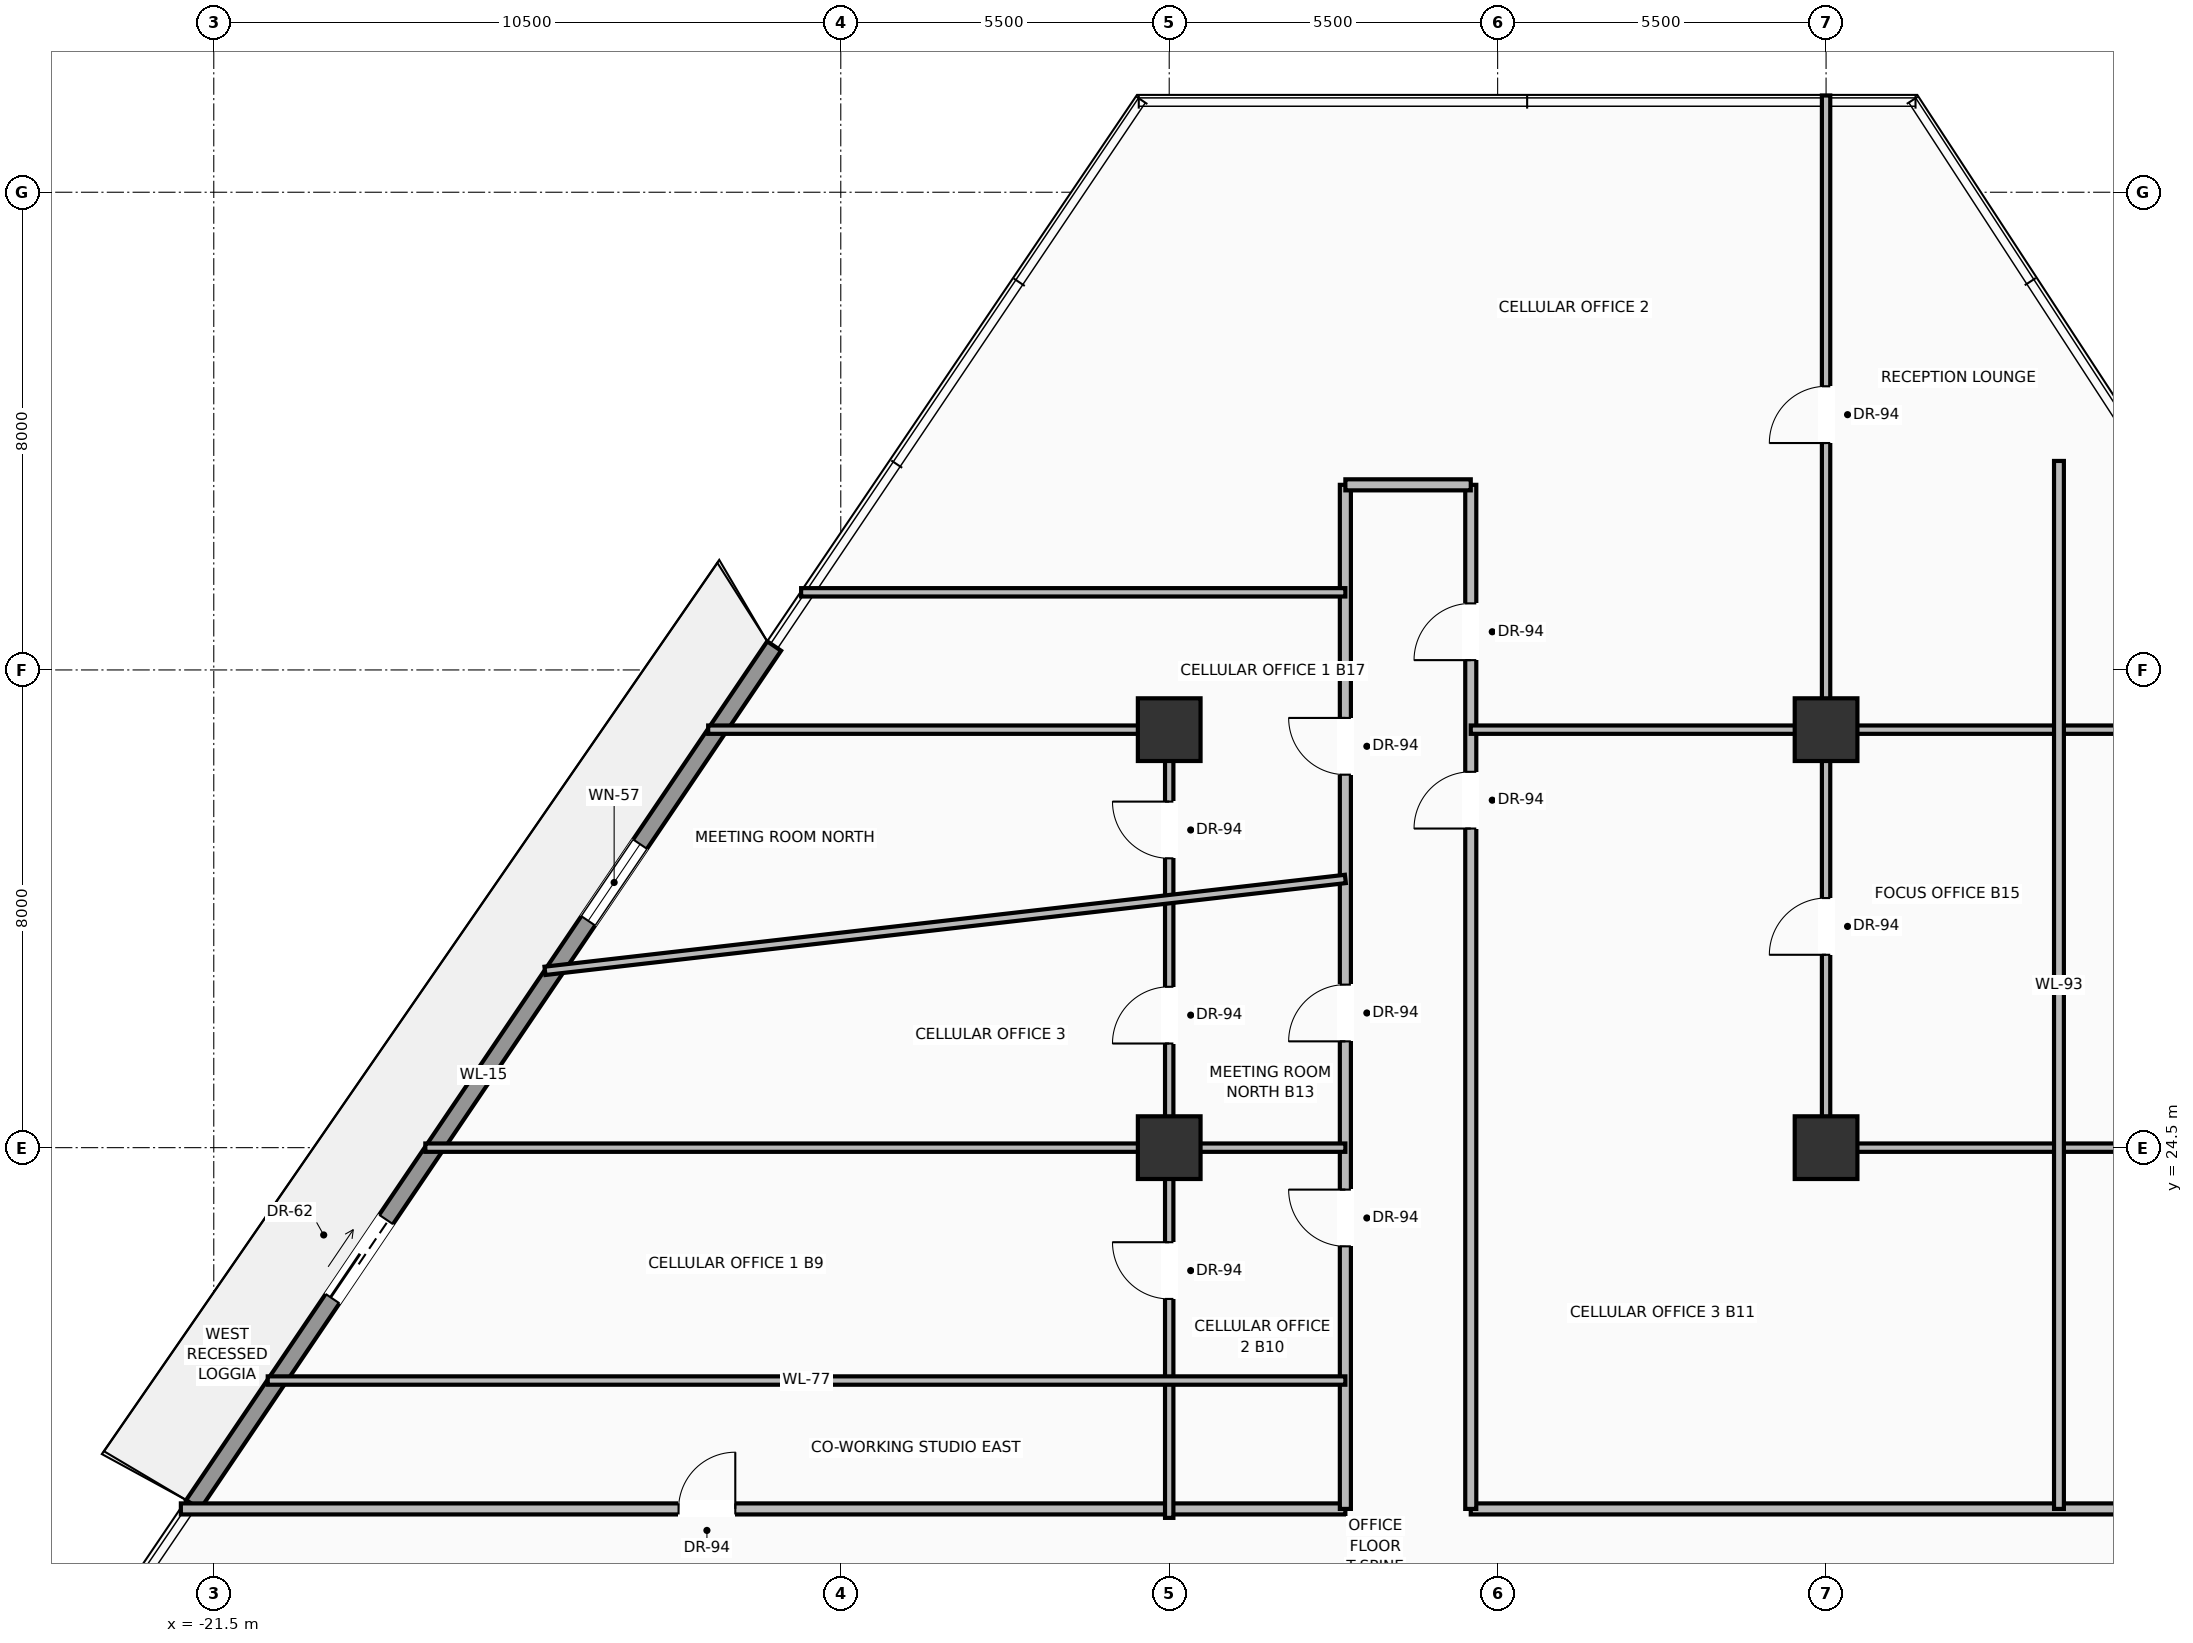
"""IFC4 building model, lengths in metres.
Left out: names, types, materials, properties, quantities, classifications, styles, units other than length and angle.
Written with IfcOpenShell. Run it as: python <this file> out.ifc"""

import sys

from ifc_helpers import new_model, si_unit, direction, frame, frame_2d, origin, origin_2d, place, context, subcontext, project, spatial, rectangle, extrude, source, transform, mapped, element, fill, save


model = new_model("IFC4")
c1 = context("Model", 3, precision=1e-05, world=origin(), true_north=direction((0.0, 1.0)))
c2 = subcontext(c1, "Body", "Model", "MODEL_VIEW")
j1 = project(units=[si_unit("LENGTHUNIT", "METRE"), si_unit("PLANEANGLEUNIT", "RADIAN")], contexts=[c1])
p1 = place(None, origin())
s1 = spatial("IfcSite", under=j1, at=p1, CompositionType="ELEMENT")
p2 = place(p1, origin())
s2 = spatial("IfcBuilding", under=s1, at=p2, CompositionType="ELEMENT")
p3 = place(p2, frame((0.0, 0.0, 80.3)))
s3 = spatial("IfcBuildingStorey", under=s2, at=p3, CompositionType="ELEMENT", Elevation=80.3)
m1 = source(origin(), c2, "Body", "SweptSolid", [
    extrude(rectangle(XDim=1.05, YDim=1.05, at=origin_2d()), origin(), (0.0, 0.0, 1.0), 3.7),
])
for number, where, z_axis, x_axis in (
    (1, (-5.5, 24.5, 0.0), (0.0, 0.0, 1.0), (1.0, 0.0, 0.0)),
    (2, (5.5, 24.5, 0.0), (0.0, 0.0, 1.0), (1.0, 0.0, 0.0)),
    (3, (-5.5, 31.5, 0.0), (0.0, 0.0, 1.0), (1.0, 0.0, 0.0)),
    (4, (5.5, 31.5, 0.0), (0.0, 0.0, 1.0), (1.0, 0.0, 0.0)),
):
    element("IfcColumn", number, at=place(p3, frame(where, z_axis=z_axis, x_axis=x_axis)), inside=s3, PredefinedType="COLUMN", context=c2, shape_type="MappedRepresentation", body=[
        mapped(m1, transform((0.0, 0.0, 0.0), scale=1.0)),
    ])
p4 = place(p3, frame((-21.846, 18.521, 0.0), z_axis=(0.0, 0.0, 1.0), x_axis=(0.560417461997, 0.828210280236, 0.0)))
e5 = element("IfcWall", 5, at=p4, inside=s3, PredefinedType="SOLIDWALL", context=c2, shape_type="SweptSolid", body=[
    extrude(rectangle(XDim=17.363, YDim=0.28, at=frame_2d((8.681, 0.0))), origin(), (0.0, 0.0, 1.0), 3.03),
])
p5 = place(p4, frame((4.167, 0.0, 0.0)))
e6 = element("IfcOpeningElement", 6, at=p5, cuts=e5, PredefinedType="OPENING", context=c2, shape_type="SweptSolid", body=[
    extrude(rectangle(XDim=1.6, YDim=2.35, at=frame_2d((0.8, 1.175))), frame((0.0, 0.15, 0.0), z_axis=(0.0, -1.0, 0.0), x_axis=(1.0, 0.0, 0.0)), (0.0, 0.0, 1.0), 0.3),
])
p6 = place(p4, frame((11.807, 0.0, 0.9)))
e7 = element("IfcOpeningElement", 7, at=p6, cuts=e5, PredefinedType="OPENING", context=c2, shape_type="SweptSolid", body=[
    extrude(rectangle(XDim=1.55, YDim=1.85, at=frame_2d((0.775, 0.925))), frame((0.0, 0.15, 0.0), z_axis=(0.0, -1.0, 0.0), x_axis=(1.0, 0.0, 0.0)), (0.0, 0.0, 1.0), 0.3),
])
p7 = place(p3, frame((-22.051, 18.45, 0.0), z_axis=(0.0, 0.0, 1.0), x_axis=(1.0, 0.0, 0.0)))
e8 = element("IfcWall", 8, at=p7, inside=s3, PredefinedType="PARTITIONING", context=c2, shape_type="SweptSolid", body=[
    extrude(rectangle(XDim=19.501, YDim=0.185, at=frame_2d((9.75, 0.0))), origin(), (0.0, 0.0, 1.0), 2.747),
])
p8 = place(p7, frame((8.334, 0.0, 0.0)))
e9 = element("IfcOpeningElement", 9, at=p8, cuts=e8, PredefinedType="OPENING", context=c2, shape_type="SweptSolid", body=[
    extrude(rectangle(XDim=0.95, YDim=2.2, at=frame_2d((0.475, 1.1))), frame((0.0, 0.103, 0.0), z_axis=(0.0, -1.0, 0.0), x_axis=(1.0, 0.0, 0.0)), (0.0, 0.0, 1.0), 0.205),
])
p9 = place(p3, frame((-0.45, 18.45, 0.0), z_axis=(0.0, 0.0, 1.0), x_axis=(1.0, 0.0, 0.0)))
e10 = element("IfcWall", 10, at=p9, inside=s3, PredefinedType="PARTITIONING", context=c2, shape_type="SweptSolid", body=[
    extrude(rectangle(XDim=22.934, YDim=0.185, at=frame_2d((11.467, 0.0))), origin(), (0.0, 0.0, 1.0), 2.747),
])
p10 = place(p9, frame((12.104, 0.0, 0.0)))
e11 = element("IfcOpeningElement", 11, at=p10, cuts=e10, PredefinedType="OPENING", context=c2, shape_type="SweptSolid", body=[
    extrude(rectangle(XDim=0.95, YDim=2.2, at=frame_2d((0.475, 1.1))), frame((0.0, 0.103, 0.0), z_axis=(0.0, -1.0, 0.0), x_axis=(1.0, 0.0, 0.0)), (0.0, 0.0, 1.0), 0.205),
])
p11 = place(p3, frame((-2.55, 18.45, 0.0), z_axis=(0.0, 0.0, 1.0), x_axis=(0.0, 1.0, 0.0)))
e12 = element("IfcWall", 12, at=p11, inside=s3, PredefinedType="PARTITIONING", context=c2, shape_type="SweptSolid", body=[
    extrude(rectangle(XDim=17.15, YDim=0.185, at=frame_2d((8.575, 0.0))), origin(), (0.0, 0.0, 1.0), 2.747),
])
p12 = place(p11, frame((4.397, 0.0, 0.0)))
e13 = element("IfcOpeningElement", 13, at=p12, cuts=e12, PredefinedType="OPENING", context=c2, shape_type="SweptSolid", body=[
    extrude(rectangle(XDim=0.95, YDim=2.2, at=frame_2d((0.475, 1.1))), frame((0.0, 0.103, 0.0), z_axis=(0.0, -1.0, 0.0), x_axis=(1.0, 0.0, 0.0)), (0.0, 0.0, 1.0), 0.205),
])
p13 = place(p11, frame((7.83, 0.0, 0.0)))
e14 = element("IfcOpeningElement", 14, at=p13, cuts=e12, PredefinedType="OPENING", context=c2, shape_type="SweptSolid", body=[
    extrude(rectangle(XDim=0.95, YDim=2.2, at=frame_2d((0.475, 1.1))), frame((0.0, 0.103, 0.0), z_axis=(0.0, -1.0, 0.0), x_axis=(1.0, 0.0, 0.0)), (0.0, 0.0, 1.0), 0.205),
])
p14 = place(p11, frame((12.296, 0.0, 0.0)))
e15 = element("IfcOpeningElement", 15, at=p14, cuts=e12, PredefinedType="OPENING", context=c2, shape_type="SweptSolid", body=[
    extrude(rectangle(XDim=0.95, YDim=2.2, at=frame_2d((0.475, 1.1))), frame((0.0, 0.103, 0.0), z_axis=(0.0, -1.0, 0.0), x_axis=(1.0, 0.0, 0.0)), (0.0, 0.0, 1.0), 0.205),
])
p15 = place(p3, frame((-0.45, 18.45, 0.0), z_axis=(0.0, 0.0, 1.0), x_axis=(0.0, 1.0, 0.0)))
e16 = element("IfcWall", 16, at=p15, inside=s3, PredefinedType="PARTITIONING", context=c2, shape_type="SweptSolid", body=[
    extrude(rectangle(XDim=17.15, YDim=0.185, at=frame_2d((8.575, 0.0))), origin(), (0.0, 0.0, 1.0), 2.747),
])
p16 = place(p15, frame((11.394, 0.0, 0.0)))
e17 = element("IfcOpeningElement", 17, at=p16, cuts=e16, PredefinedType="OPENING", context=c2, shape_type="SweptSolid", body=[
    extrude(rectangle(XDim=0.95, YDim=2.2, at=frame_2d((0.475, 1.1))), frame((0.0, 0.103, 0.0), z_axis=(0.0, -1.0, 0.0), x_axis=(1.0, 0.0, 0.0)), (0.0, 0.0, 1.0), 0.205),
])
p17 = place(p15, frame((14.214, 0.0, 0.0)))
e18 = element("IfcOpeningElement", 18, at=p17, cuts=e16, PredefinedType="OPENING", context=c2, shape_type="SweptSolid", body=[
    extrude(rectangle(XDim=0.95, YDim=2.2, at=frame_2d((0.475, 1.1))), frame((0.0, 0.103, 0.0), z_axis=(0.0, -1.0, 0.0), x_axis=(1.0, 0.0, 0.0)), (0.0, 0.0, 1.0), 0.205),
])
p18 = place(p3, frame((-2.55, 35.6, 0.0), z_axis=(0.0, 0.0, 1.0), x_axis=(1.0, 0.0, 0.0)))
e19 = element("IfcWall", 19, at=p18, inside=s3, PredefinedType="PARTITIONING", context=c2, shape_type="SweptSolid", body=[
    extrude(rectangle(XDim=2.1, YDim=0.185, at=frame_2d((1.05, 0.0))), origin(), (0.0, 0.0, 1.0), 3.442),
])
p19 = place(p3, frame((-5.5, 18.3, 0.0), z_axis=(0.0, 0.0, 1.0), x_axis=(0.0, 1.0, 0.0)))
e20 = element("IfcWall", 20, at=p19, inside=s3, PredefinedType="PARTITIONING", context=c2, shape_type="SweptSolid", body=[
    extrude(rectangle(XDim=13.2, YDim=0.14, at=frame_2d((6.6, 0.0))), origin(), (0.0, 0.0, 1.0), 2.747),
])
p20 = place(p19, frame((3.667, 0.0, 0.0)))
e21 = element("IfcOpeningElement", 21, at=p20, cuts=e20, PredefinedType="OPENING", context=c2, shape_type="SweptSolid", body=[
    extrude(rectangle(XDim=0.95, YDim=2.2, at=frame_2d((0.475, 1.1))), frame((0.0, 0.08, 0.0), z_axis=(0.0, -1.0, 0.0), x_axis=(1.0, 0.0, 0.0)), (0.0, 0.0, 1.0), 0.16),
])
p21 = place(p19, frame((7.944, 0.0, 0.0)))
e22 = element("IfcOpeningElement", 22, at=p21, cuts=e20, PredefinedType="OPENING", context=c2, shape_type="SweptSolid", body=[
    extrude(rectangle(XDim=0.95, YDim=2.2, at=frame_2d((0.475, 1.1))), frame((0.0, 0.08, 0.0), z_axis=(0.0, -1.0, 0.0), x_axis=(1.0, 0.0, 0.0)), (0.0, 0.0, 1.0), 0.16),
])
p22 = place(p19, frame((11.045, 0.0, 0.0)))
e23 = element("IfcOpeningElement", 23, at=p22, cuts=e20, PredefinedType="OPENING", context=c2, shape_type="SweptSolid", body=[
    extrude(rectangle(XDim=0.95, YDim=2.2, at=frame_2d((0.475, 1.1))), frame((0.0, 0.08, 0.0), z_axis=(0.0, -1.0, 0.0), x_axis=(1.0, 0.0, 0.0)), (0.0, 0.0, 1.0), 0.16),
])
p23 = place(p3, frame((5.5, 24.5, 0.0), z_axis=(0.0, 0.0, 1.0), x_axis=(0.0, 1.0, 0.0)))
e24 = element("IfcWall", 24, at=p23, inside=s3, PredefinedType="PARTITIONING", context=c2, shape_type="SweptSolid", body=[
    extrude(rectangle(XDim=17.62, YDim=0.14, at=frame_2d((8.81, 0.0))), origin(), (0.0, 0.0, 1.0), 2.747),
])
p24 = place(p23, frame((3.23, 0.0, 0.0)))
e25 = element("IfcOpeningElement", 25, at=p24, cuts=e24, PredefinedType="OPENING", context=c2, shape_type="SweptSolid", body=[
    extrude(rectangle(XDim=0.95, YDim=2.2, at=frame_2d((0.475, 1.1))), frame((0.0, 0.08, 0.0), z_axis=(0.0, -1.0, 0.0), x_axis=(1.0, 0.0, 0.0)), (0.0, 0.0, 1.0), 0.16),
])
p25 = place(p23, frame((11.8, 0.0, 0.0)))
e26 = element("IfcOpeningElement", 26, at=p25, cuts=e24, PredefinedType="OPENING", context=c2, shape_type="SweptSolid", body=[
    extrude(rectangle(XDim=0.95, YDim=2.2, at=frame_2d((0.475, 1.1))), frame((0.0, 0.08, 0.0), z_axis=(0.0, -1.0, 0.0), x_axis=(1.0, 0.0, 0.0)), (0.0, 0.0, 1.0), 0.16),
])
p26 = place(p3, frame((-13.221, 31.5, 0.0), z_axis=(0.0, 0.0, 1.0), x_axis=(1.0, 0.0, 0.0)))
e27 = element("IfcWall", 27, at=p26, inside=s3, PredefinedType="PARTITIONING", context=c2, shape_type="SweptSolid", body=[
    extrude(rectangle(XDim=7.721, YDim=0.14, at=frame_2d((3.86, 0.0))), origin(), (0.0, 0.0, 1.0), 2.747),
])
p27 = place(p3, frame((5.5, 24.5, 0.0), z_axis=(0.0, 0.0, 1.0), x_axis=(1.0, 0.0, 0.0)))
e28 = element("IfcWall", 28, at=p27, inside=s3, PredefinedType="PARTITIONING", context=c2, shape_type="SweptSolid", body=[
    extrude(rectangle(XDim=13.032, YDim=0.14, at=frame_2d((6.516, 0.0))), origin(), (0.0, 0.0, 1.0), 2.747),
])
p28 = place(p27, frame((7.755, 0.0, 0.0)))
e29 = element("IfcOpeningElement", 29, at=p28, cuts=e28, PredefinedType="OPENING", context=c2, shape_type="SweptSolid", body=[
    extrude(rectangle(XDim=0.95, YDim=2.2, at=frame_2d((0.475, 1.1))), frame((0.0, 0.08, 0.0), z_axis=(0.0, -1.0, 0.0), x_axis=(1.0, 0.0, 0.0)), (0.0, 0.0, 1.0), 0.16),
])
p29 = place(p3, frame((-20.596, 20.6, 0.0), z_axis=(0.0, 0.0, 1.0), x_axis=(1.0, 0.0, 0.0)))
e30 = element("IfcWall", 30, at=p29, inside=s3, PredefinedType="PARTITIONING", context=c2, shape_type="SweptSolid", body=[
    extrude(rectangle(XDim=18.046, YDim=0.14, at=frame_2d((9.023, 0.0))), origin(), (0.0, 0.0, 1.0), 2.747),
])
p30 = place(p3, frame((-17.957, 24.5, 0.0), z_axis=(0.0, 0.0, 1.0), x_axis=(1.0, 0.0, 0.0)))
e31 = element("IfcWall", 31, at=p30, inside=s3, PredefinedType="PARTITIONING", context=c2, shape_type="SweptSolid", body=[
    extrude(rectangle(XDim=15.407, YDim=0.14, at=frame_2d((7.704, 0.0))), origin(), (0.0, 0.0, 1.0), 2.747),
])
p31 = place(p3, frame((-15.954, 27.461, 0.0), z_axis=(0.0, 0.0, 1.0), x_axis=(0.99347234151, 0.114073251264, 0.0)))
e32 = element("IfcWall", 32, at=p31, inside=s3, PredefinedType="PARTITIONING", context=c2, shape_type="SweptSolid", body=[
    extrude(rectangle(XDim=13.492, YDim=0.14, at=frame_2d((6.746, 0.0))), origin(), (0.0, 0.0, 1.0), 2.747),
])
p32 = place(p3, frame((-11.664, 33.8, 0.0), z_axis=(0.0, 0.0, 1.0), x_axis=(1.0, 0.0, 0.0)))
e33 = element("IfcWall", 33, at=p32, inside=s3, PredefinedType="PARTITIONING", context=c2, shape_type="SweptSolid", body=[
    extrude(rectangle(XDim=9.114, YDim=0.14, at=frame_2d((4.557, 0.0))), origin(), (0.0, 0.0, 1.0), 2.747),
])
p33 = place(p3, frame((-0.45, 31.5, 0.0), z_axis=(0.0, 0.0, 1.0), x_axis=(1.0, 0.0, 0.0)))
e34 = element("IfcWall", 34, at=p33, inside=s3, PredefinedType="PARTITIONING", context=c2, shape_type="SweptSolid", body=[
    extrude(rectangle(XDim=14.409, YDim=0.14, at=frame_2d((7.205, 0.0))), origin(), (0.0, 0.0, 1.0), 2.747),
])
p34 = place(p3, frame((9.4, 18.45, 0.0), z_axis=(0.0, 0.0, 1.0), x_axis=(0.0, 1.0, 0.0)))
e35 = element("IfcWall", 35, at=p34, inside=s3, PredefinedType="PARTITIONING", context=c2, shape_type="SweptSolid", body=[
    extrude(rectangle(XDim=17.55, YDim=0.165, at=frame_2d((8.775, 0.0))), origin(), (0.0, 0.0, 1.0), 2.747),
])
m2 = source(origin(), c2, "Body", "SweptSolid", [
    extrude(rectangle(XDim=1.6, YDim=2.35, at=frame_2d((0.8, 1.175))), frame((0.0, 0.025, 0.0), z_axis=(0.0, -1.0, 0.0), x_axis=(1.0, 0.0, 0.0)), (0.0, 0.0, 1.0), 0.05),
])
p35 = place(p5, origin())
e36 = element("IfcDoor", 36, at=p35, inside=s3, OperationType="SLIDING_TO_LEFT", PredefinedType="DOOR", context=c2, shape_type="MappedRepresentation", body=[
    mapped(m2, transform((0.0, 0.0, 0.0), scale=1.0)),
])
fill(e6, e36)
m3 = source(origin(), c2, "Body", "SweptSolid", [
    extrude(rectangle(XDim=1.55, YDim=1.85, at=frame_2d((0.775, 0.925))), frame((0.0, 0.03, 0.0), z_axis=(0.0, -1.0, 0.0), x_axis=(1.0, 0.0, 0.0)), (0.0, 0.0, 1.0), 0.06),
])
p36 = place(p6, origin())
e37 = element("IfcWindow", 37, at=p36, inside=s3, PartitioningType="SINGLE_PANEL", PredefinedType="WINDOW", context=c2, shape_type="MappedRepresentation", body=[
    mapped(m3, transform((0.0, 0.0, 0.0), scale=1.0)),
])
fill(e7, e37)
m4 = source(origin(), c2, "Body", "SweptSolid", [
    extrude(rectangle(XDim=0.95, YDim=2.2, at=frame_2d((0.475, 1.1))), frame((0.0, 0.025, 0.0), z_axis=(0.0, -1.0, 0.0), x_axis=(1.0, 0.0, 0.0)), (0.0, 0.0, 1.0), 0.05),
])
p37 = place(p8, origin())
e38 = element("IfcDoor", 38, at=p37, inside=s3, OperationType="SINGLE_SWING_RIGHT", PredefinedType="DOOR", context=c2, shape_type="MappedRepresentation", body=[
    mapped(m4, transform((0.0, 0.0, 0.0), scale=1.0)),
])
fill(e9, e38)
p38 = place(p12, origin())
e39 = element("IfcDoor", 39, at=p38, inside=s3, OperationType="SINGLE_SWING_RIGHT", PredefinedType="DOOR", context=c2, shape_type="MappedRepresentation", body=[
    mapped(m4, transform((0.0, 0.0, 0.0), scale=1.0)),
])
fill(e13, e39)
p39 = place(p16, origin())
e40 = element("IfcDoor", 40, at=p39, inside=s3, OperationType="SINGLE_SWING_LEFT", PredefinedType="DOOR", context=c2, shape_type="MappedRepresentation", body=[
    mapped(m4, transform((0.0, 0.0, 0.0), scale=1.0)),
])
fill(e17, e40)
p40 = place(p20, origin())
e41 = element("IfcDoor", 41, at=p40, inside=s3, OperationType="SINGLE_SWING_RIGHT", PredefinedType="DOOR", context=c2, shape_type="MappedRepresentation", body=[
    mapped(m4, transform((0.0, 0.0, 0.0), scale=1.0)),
])
fill(e21, e41)
p41 = place(p13, origin())
e42 = element("IfcDoor", 42, at=p41, inside=s3, OperationType="SINGLE_SWING_LEFT", PredefinedType="DOOR", context=c2, shape_type="MappedRepresentation", body=[
    mapped(m4, transform((0.0, 0.0, 0.0), scale=1.0)),
])
fill(e14, e42)
p42 = place(p24, origin())
e43 = element("IfcDoor", 43, at=p42, inside=s3, OperationType="SINGLE_SWING_LEFT", PredefinedType="DOOR", context=c2, shape_type="MappedRepresentation", body=[
    mapped(m4, transform((0.0, 0.0, 0.0), scale=1.0)),
])
fill(e25, e43)
p43 = place(p14, origin())
e44 = element("IfcDoor", 44, at=p43, inside=s3, OperationType="SINGLE_SWING_RIGHT", PredefinedType="DOOR", context=c2, shape_type="MappedRepresentation", body=[
    mapped(m4, transform((0.0, 0.0, 0.0), scale=1.0)),
])
fill(e15, e44)
p44 = place(p17, origin())
e45 = element("IfcDoor", 45, at=p44, inside=s3, OperationType="SINGLE_SWING_LEFT", PredefinedType="DOOR", context=c2, shape_type="MappedRepresentation", body=[
    mapped(m4, transform((0.0, 0.0, 0.0), scale=1.0)),
])
fill(e18, e45)
p45 = place(p21, origin())
e46 = element("IfcDoor", 46, at=p45, inside=s3, OperationType="SINGLE_SWING_LEFT", PredefinedType="DOOR", context=c2, shape_type="MappedRepresentation", body=[
    mapped(m4, transform((0.0, 0.0, 0.0), scale=1.0)),
])
fill(e22, e46)
p46 = place(p22, origin())
e47 = element("IfcDoor", 47, at=p46, inside=s3, OperationType="SINGLE_SWING_RIGHT", PredefinedType="DOOR", context=c2, shape_type="MappedRepresentation", body=[
    mapped(m4, transform((0.0, 0.0, 0.0), scale=1.0)),
])
fill(e23, e47)
p47 = place(p25, origin())
e48 = element("IfcDoor", 48, at=p47, inside=s3, OperationType="SINGLE_SWING_LEFT", PredefinedType="DOOR", context=c2, shape_type="MappedRepresentation", body=[
    mapped(m4, transform((0.0, 0.0, 0.0), scale=1.0)),
])
fill(e26, e48)
save(model, sys.argv[1])
